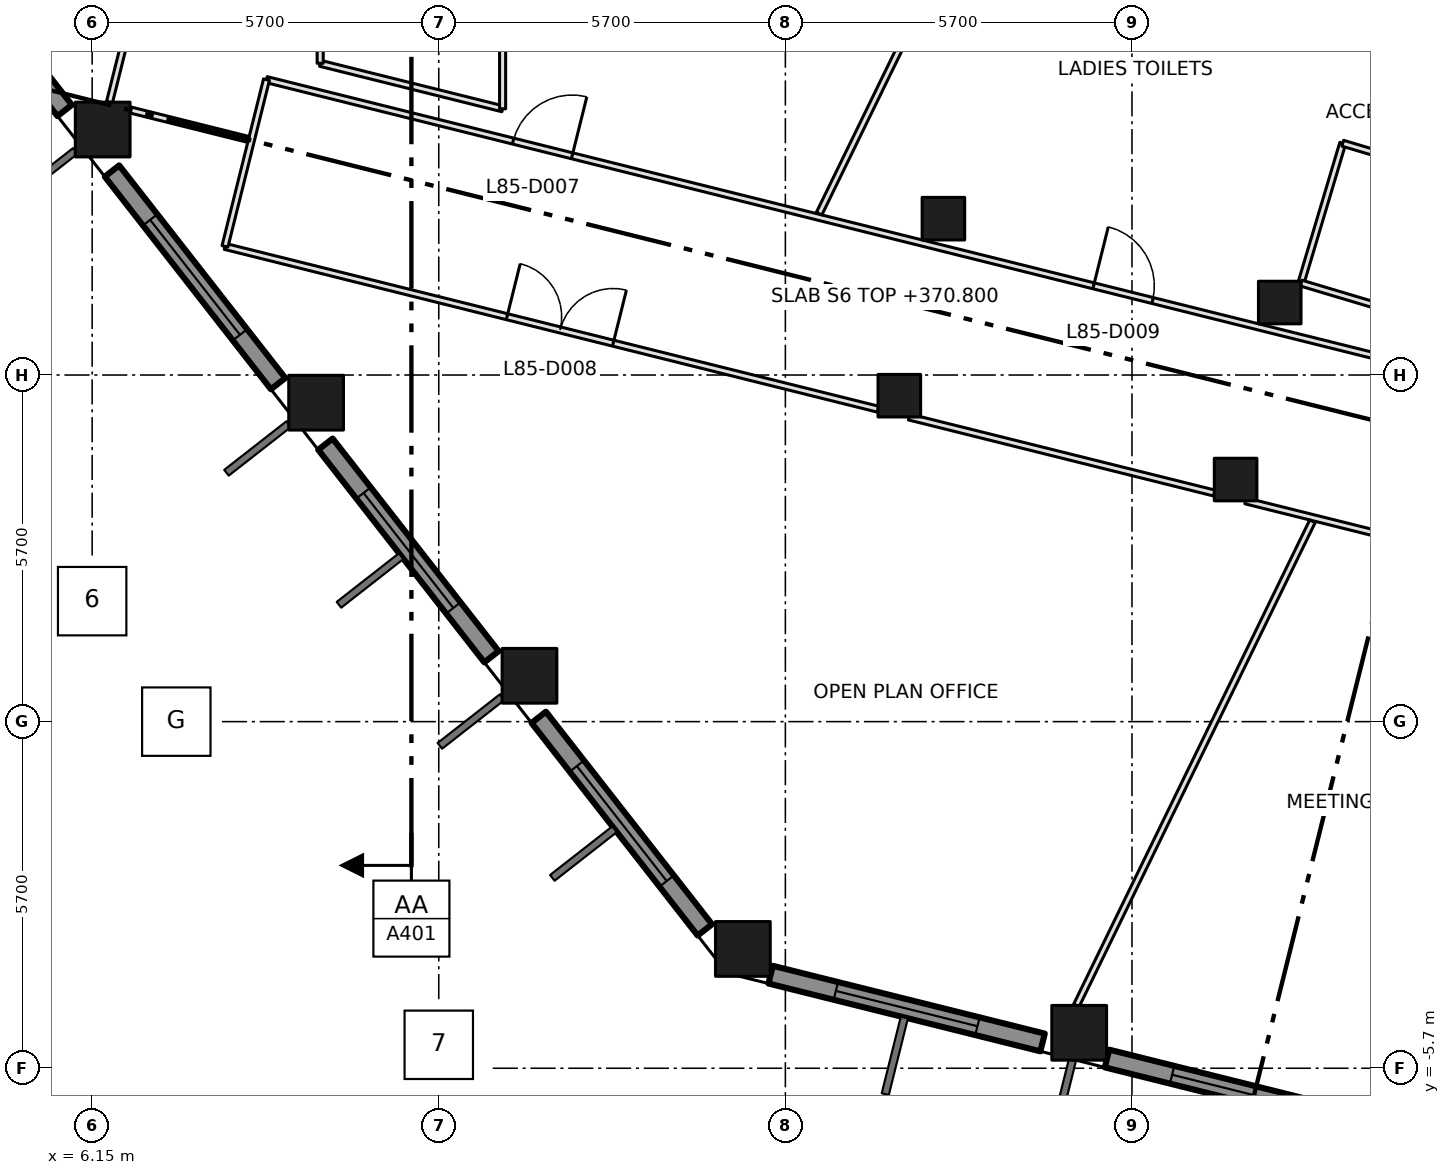
"""IFC4 building model, lengths in metres.
Left out: names, types, materials, properties, quantities, classifications, styles, units other than length and angle.
Written with IfcOpenShell. Run it as: python <this file> out.ifc"""

import sys

from ifc_helpers import new_model, si_unit, direction, frame, frame_2d, origin, origin_2d, place, context, subcontext, project, spatial, rectangle, extrude, element, fill, save


model = new_model("IFC4")
c1 = context("Model", 3, precision=1e-05, world=origin(), true_north=direction((0.0, 1.0)))
c2 = subcontext(c1, "Body", "Model", "MODEL_VIEW")
j1 = project(units=[si_unit("LENGTHUNIT", "METRE"), si_unit("PLANEANGLEUNIT", "RADIAN")], contexts=[c1])
p1 = place(None, origin())
s1 = spatial("IfcSite", under=j1, at=p1, CompositionType="ELEMENT")
p2 = place(p1, origin())
s2 = spatial("IfcBuilding", under=s1, at=p2, CompositionType="ELEMENT")
p3 = place(p2, frame((0.0, 0.0, 370.8)))
s3 = spatial("IfcBuildingStorey", under=s2, at=p3, CompositionType="ELEMENT", Elevation=370.8)
for number, where, z_axis, x_axis in (
    (1, (16.851, -3.738, 0.0), (0.0, 0.0, 1.0), (1.0, 0.0, 0.0)),
    (2, (13.342, 0.754, 0.0), (0.0, 0.0, 1.0), (1.0, 0.0, 0.0)),
    (3, (9.833, 5.245, 0.0), (0.0, 0.0, 1.0), (1.0, 0.0, 0.0)),
    (4, (6.323, 9.737, 0.0), (0.0, 0.0, 1.0), (1.0, 0.0, 0.0)),
    (5, (22.382, -5.117, 0.0), (0.0, 0.0, 1.0), (1.0, 0.0, 0.0)),
):
    element("IfcColumn", number, at=place(p3, frame(where, z_axis=z_axis, x_axis=x_axis)), inside=s3, PredefinedType="COLUMN", context=c2, shape_type="SweptSolid", body=[
        extrude(rectangle(XDim=0.9, YDim=0.9, at=origin_2d()), origin(), (0.0, 0.0, 1.0), 4.2),
    ])
for number, where, z_axis, x_axis in (
    (6, (19.424, 5.36, 0.0), (0.0, 0.0, 1.0), (1.0, 0.0, 0.0)),
    (7, (24.954, 3.981, 0.0), (0.0, 0.0, 1.0), (1.0, 0.0, 0.0)),
    (8, (20.149, 8.271, 0.0), (0.0, 0.0, 1.0), (1.0, 0.0, 0.0)),
    (9, (25.68, 6.892, 0.0), (0.0, 0.0, 1.0), (1.0, 0.0, 0.0)),
):
    element("IfcColumn", number, at=place(p3, frame(where, z_axis=z_axis, x_axis=x_axis)), inside=s3, PredefinedType="COLUMN", context=c2, shape_type="SweptSolid", body=[
        extrude(rectangle(XDim=0.7, YDim=0.7, at=origin_2d()), origin(), (0.0, 0.0, 1.0), 4.2),
    ])
p4 = place(p3, frame((2.967, 13.547, 0.0), z_axis=(0.0, 0.0, 1.0), x_axis=(0.615486001463, -0.788147817356, 0.0)))
e10 = element("IfcWall", 10, at=p4, inside=s3, PredefinedType="SOLIDWALL", context=c2, shape_type="SweptSolid", body=[
    extrude(rectangle(XDim=4.437, YDim=0.3, at=frame_2d((2.219, 0.0))), origin(), (0.0, 0.0, 1.0), 3.2),
])
p5 = place(p4, frame((1.018, 0.0, 0.8)))
e11 = element("IfcOpeningElement", 11, at=p5, cuts=e10, PredefinedType="OPENING", context=c2, shape_type="SweptSolid", body=[
    extrude(rectangle(XDim=2.4, YDim=2.1, at=frame_2d((1.2, 1.05))), frame((0.0, 0.16, 0.0), z_axis=(0.0, -1.0, 0.0), x_axis=(1.0, 0.0, 0.0)), (0.0, 0.0, 1.0), 0.32),
])
p6 = place(p3, frame((6.476, 9.055, 0.0), z_axis=(0.0, 0.0, 1.0), x_axis=(0.615649380255, -0.788020203162, 0.0)))
e12 = element("IfcWall", 12, at=p6, inside=s3, PredefinedType="SOLIDWALL", context=c2, shape_type="SweptSolid", body=[
    extrude(rectangle(XDim=4.438, YDim=0.3, at=frame_2d((2.219, 0.0))), origin(), (0.0, 0.0, 1.0), 3.2),
])
p7 = place(p6, frame((1.019, 0.0, 0.8)))
e13 = element("IfcOpeningElement", 13, at=p7, cuts=e12, PredefinedType="OPENING", context=c2, shape_type="SweptSolid", body=[
    extrude(rectangle(XDim=2.4, YDim=2.1, at=frame_2d((1.2, 1.05))), frame((0.0, 0.16, 0.0), z_axis=(0.0, -1.0, 0.0), x_axis=(1.0, 0.0, 0.0)), (0.0, 0.0, 1.0), 0.32),
])
p8 = place(p3, frame((9.986, 4.563, 0.0), z_axis=(0.0, 0.0, 1.0), x_axis=(0.615592779411, -0.788064419915, 0.0)))
e14 = element("IfcWall", 14, at=p8, inside=s3, PredefinedType="SOLIDWALL", context=c2, shape_type="SweptSolid", body=[
    extrude(rectangle(XDim=4.436, YDim=0.3, at=frame_2d((2.218, 0.0))), origin(), (0.0, 0.0, 1.0), 3.2),
])
p9 = place(p8, frame((1.018, 0.0, 0.8)))
e15 = element("IfcOpeningElement", 15, at=p9, cuts=e14, PredefinedType="OPENING", context=c2, shape_type="SweptSolid", body=[
    extrude(rectangle(XDim=2.4, YDim=2.1, at=frame_2d((1.2, 1.05))), frame((0.0, 0.16, 0.0), z_axis=(0.0, -1.0, 0.0), x_axis=(1.0, 0.0, 0.0)), (0.0, 0.0, 1.0), 0.32),
])
p10 = place(p3, frame((13.494, 0.071, 0.0), z_axis=(0.0, 0.0, 1.0), x_axis=(0.615763624226, -0.787930935476, 0.0)))
e16 = element("IfcWall", 16, at=p10, inside=s3, PredefinedType="SOLIDWALL", context=c2, shape_type="SweptSolid", body=[
    extrude(rectangle(XDim=4.437, YDim=0.3, at=frame_2d((2.219, 0.0))), origin(), (0.0, 0.0, 1.0), 3.2),
])
p11 = place(p10, frame((1.018, 0.0, 0.8)))
e17 = element("IfcOpeningElement", 17, at=p11, cuts=e16, PredefinedType="OPENING", context=c2, shape_type="SweptSolid", body=[
    extrude(rectangle(XDim=2.4, YDim=2.1, at=frame_2d((1.2, 1.05))), frame((0.0, 0.16, 0.0), z_axis=(0.0, -1.0, 0.0), x_axis=(1.0, 0.0, 0.0)), (0.0, 0.0, 1.0), 0.32),
])
p12 = place(p3, frame((17.308, -4.161, 0.0), z_axis=(0.0, 0.0, 1.0), x_axis=(0.970294992984, -0.241924836652, 0.0)))
e18 = element("IfcWall", 18, at=p12, inside=s3, PredefinedType="SOLIDWALL", context=c2, shape_type="SweptSolid", body=[
    extrude(rectangle(XDim=4.609, YDim=0.3, at=frame_2d((2.304, 0.0))), origin(), (0.0, 0.0, 1.0), 3.2),
])
p13 = place(p12, frame((1.105, 0.0, 0.8)))
e19 = element("IfcOpeningElement", 19, at=p13, cuts=e18, PredefinedType="OPENING", context=c2, shape_type="SweptSolid", body=[
    extrude(rectangle(XDim=2.4, YDim=2.1, at=frame_2d((1.2, 1.05))), frame((0.0, 0.16, 0.0), z_axis=(0.0, -1.0, 0.0), x_axis=(1.0, 0.0, 0.0)), (0.0, 0.0, 1.0), 0.32),
])
p14 = place(p3, frame((22.839, -5.54, 0.0), z_axis=(0.0, 0.0, 1.0), x_axis=(0.970282587769, -0.241974585177, 0.0)))
e20 = element("IfcWall", 20, at=p14, inside=s3, PredefinedType="SOLIDWALL", context=c2, shape_type="SweptSolid", body=[
    extrude(rectangle(XDim=4.608, YDim=0.3, at=frame_2d((2.304, 0.0))), origin(), (0.0, 0.0, 1.0), 3.2),
])
p15 = place(p14, frame((1.104, 0.0, 0.8)))
e21 = element("IfcOpeningElement", 21, at=p15, cuts=e20, PredefinedType="OPENING", context=c2, shape_type="SweptSolid", body=[
    extrude(rectangle(XDim=2.4, YDim=2.1, at=frame_2d((1.2, 1.05))), frame((0.0, 0.16, 0.0), z_axis=(0.0, -1.0, 0.0), x_axis=(1.0, 0.0, 0.0)), (0.0, 0.0, 1.0), 0.32),
])
p16 = place(p3, frame((8.334, 7.815, 0.0), z_axis=(0.0, 0.0, 1.0), x_axis=(0.970312231044, -0.241855688968, 0.0)))
e22 = element("IfcWall", 22, at=p16, inside=s3, PredefinedType="PARTITIONING", context=c2, shape_type="SweptSolid", body=[
    extrude(rectangle(XDim=11.069, YDim=0.1, at=frame_2d((5.534, 0.0))), origin(), (0.0, 0.0, 1.0), 3.9),
])
p17 = place(p16, frame((4.78, 0.0, 0.0)))
e23 = element("IfcOpeningElement", 23, at=p17, cuts=e22, PredefinedType="OPENING", context=c2, shape_type="SweptSolid", body=[
    extrude(rectangle(XDim=1.8, YDim=2.1, at=frame_2d((0.9, 1.05))), frame((0.0, 0.06, 0.0), z_axis=(0.0, -1.0, 0.0), x_axis=(1.0, 0.0, 0.0)), (0.0, 0.0, 1.0), 0.12),
])
p18 = place(p3, frame((9.017, 10.558, 0.0), z_axis=(0.0, 0.0, 1.0), x_axis=(0.970297621765, -0.241914293082, 0.0)))
e24 = element("IfcWall", 24, at=p18, inside=s3, PredefinedType="PARTITIONING", context=c2, shape_type="SweptSolid", body=[
    extrude(rectangle(XDim=19.879, YDim=0.1, at=frame_2d((9.94, 0.0))), origin(), (0.0, 0.0, 1.0), 3.9),
])
p19 = place(p18, frame((4.18, 0.0, 0.0)))
e25 = element("IfcOpeningElement", 25, at=p19, cuts=e24, PredefinedType="OPENING", context=c2, shape_type="SweptSolid", body=[
    extrude(rectangle(XDim=1.0, YDim=2.1, at=frame_2d((0.5, 1.05))), frame((0.0, 0.06, 0.0), z_axis=(0.0, -1.0, 0.0), x_axis=(1.0, 0.0, 0.0)), (0.0, 0.0, 1.0), 0.12),
])
p20 = place(p18, frame((14.018, 0.0, 0.0)))
e26 = element("IfcOpeningElement", 26, at=p20, cuts=e24, PredefinedType="OPENING", context=c2, shape_type="SweptSolid", body=[
    extrude(rectangle(XDim=1.0, YDim=2.1, at=frame_2d((0.5, 1.05))), frame((0.0, 0.06, 0.0), z_axis=(0.0, -1.0, 0.0), x_axis=(1.0, 0.0, 0.0)), (0.0, 0.0, 1.0), 0.12),
])
p21 = place(p3, frame((9.017, 10.558, 0.0), z_axis=(0.0, 0.0, 1.0), x_axis=(-0.241641419317, -0.970365613813, 0.0)))
e27 = element("IfcWall", 27, at=p21, inside=s3, PredefinedType="PARTITIONING", context=c2, shape_type="SweptSolid", body=[
    extrude(rectangle(XDim=2.827, YDim=0.1, at=frame_2d((1.414, 0.0))), origin(), (0.0, 0.0, 1.0), 3.9),
])
p22 = place(p3, frame((9.9, 10.826, 0.0), z_axis=(0.0, 0.0, 1.0), x_axis=(0.970290953223, -0.241941038466, 0.0)))
e28 = element("IfcWall", 28, at=p22, inside=s3, PredefinedType="PARTITIONING", context=c2, shape_type="SweptSolid", body=[
    extrude(rectangle(XDim=3.092, YDim=0.1, at=frame_2d((1.546, 0.0))), origin(), (0.0, 0.0, 1.0), 3.9),
])
p23 = place(p3, frame((9.9, 12.2, 0.0), z_axis=(0.0, 0.0, 1.0), x_axis=(0.0, -1.0, 0.0)))
e29 = element("IfcWall", 29, at=p23, inside=s3, PredefinedType="PARTITIONING", context=c2, shape_type="SweptSolid", body=[
    extrude(rectangle(XDim=1.374, YDim=0.1, at=frame_2d((0.687, 0.0))), origin(), (0.0, 0.0, 1.0), 3.9),
])
p24 = place(p3, frame((12.9, 10.078, 0.0), z_axis=(0.0, 0.0, 1.0), x_axis=(0.0, 1.0, 0.0)))
e30 = element("IfcWall", 30, at=p24, inside=s3, PredefinedType="PARTITIONING", context=c2, shape_type="SweptSolid", body=[
    extrude(rectangle(XDim=4.022, YDim=0.1, at=frame_2d((2.011, 0.0))), origin(), (0.0, 0.0, 1.0), 3.9),
])
p25 = place(p3, frame((19.586, 5.01, 0.0), z_axis=(0.0, 0.0, 1.0), x_axis=(0.970303347181, -0.241891327769, 0.0)))
e31 = element("IfcWall", 31, at=p25, inside=s3, PredefinedType="PARTITIONING", context=c2, shape_type="SweptSolid", body=[
    extrude(rectangle(XDim=5.172, YDim=0.1, at=frame_2d((2.586, 0.0))), origin(), (0.0, 0.0, 1.0), 3.9),
])
p26 = place(p3, frame((25.118, 3.631, 0.0), z_axis=(0.0, 0.0, 1.0), x_axis=(0.970281210621, -0.241980107272, 0.0)))
e32 = element("IfcWall", 32, at=p26, inside=s3, PredefinedType="PARTITIONING", context=c2, shape_type="SweptSolid", body=[
    extrude(rectangle(XDim=5.171, YDim=0.1, at=frame_2d((2.585, 0.0))), origin(), (0.0, 0.0, 1.0), 3.9),
])
p27 = place(p26, frame((2.629, 0.0, 0.0)))
e33 = element("IfcOpeningElement", 33, at=p27, cuts=e32, PredefinedType="OPENING", context=c2, shape_type="SweptSolid", body=[
    extrude(rectangle(XDim=1.0, YDim=2.1, at=frame_2d((0.5, 1.05))), frame((0.0, 0.06, 0.0), z_axis=(0.0, -1.0, 0.0), x_axis=(1.0, 0.0, 0.0)), (0.0, 0.0, 1.0), 0.12),
])
p28 = place(p3, frame((6.922, 12.138, 0.0), z_axis=(0.0, 0.0, 1.0), x_axis=(-0.24222136375, -0.97022101139, 0.0)))
e34 = element("IfcWall", 34, at=p28, inside=s3, PredefinedType="PARTITIONING", context=c2, shape_type="SweptSolid", body=[
    extrude(rectangle(XDim=2.011, YDim=0.1, at=frame_2d((1.005, 0.0))), origin(), (0.0, 0.0, 1.0), 3.9),
])
p29 = place(p3, frame((8.72, 9.574, 0.0), z_axis=(0.0, 0.0, 1.0), x_axis=(-0.970221168815, 0.24222073318, 0.0)))
e35 = element("IfcWall", 35, at=p29, inside=s3, PredefinedType="PARTITIONING", context=c2, shape_type="SweptSolid", body=[
    extrude(rectangle(XDim=2.007, YDim=0.1, at=frame_2d((1.003, 0.0))), origin(), (0.0, 0.0, 1.0), 3.9),
])
p30 = place(p3, frame((18.105, 8.354, 0.0), z_axis=(0.0, 0.0, 1.0), x_axis=(0.438424384383, 0.898768078638, 0.0)))
e36 = element("IfcWall", 36, at=p30, inside=s3, PredefinedType="PARTITIONING", context=c2, shape_type="SweptSolid", body=[
    extrude(rectangle(XDim=6.393, YDim=0.1, at=frame_2d((3.197, 0.0))), origin(), (0.0, 0.0, 1.0), 3.9),
])
p31 = place(p3, frame((22.336, -4.667, 0.0), z_axis=(0.0, 0.0, 1.0), x_axis=(0.438261260169, 0.89884763327, 0.0)))
e37 = element("IfcWall", 37, at=p31, inside=s3, PredefinedType="PARTITIONING", context=c2, shape_type="SweptSolid", body=[
    extrude(rectangle(XDim=8.858, YDim=0.1, at=frame_2d((4.429, 0.0))), origin(), (0.0, 0.0, 1.0), 3.9),
])
p32 = place(p3, frame((26.03, 7.214, 0.0), z_axis=(0.0, 0.0, 1.0), x_axis=(0.286077381682, 0.958206518288, 0.0)))
e38 = element("IfcWall", 38, at=p32, inside=s3, PredefinedType="PARTITIONING", context=c2, shape_type="SweptSolid", body=[
    extrude(rectangle(XDim=2.398, YDim=0.1, at=frame_2d((1.199, 0.0))), origin(), (0.0, 0.0, 1.0), 3.9),
])
p33 = place(p3, frame((26.716, 9.512, 0.0), z_axis=(0.0, 0.0, 1.0), x_axis=(0.958168093169, -0.286206053804, 0.0)))
e39 = element("IfcWall", 39, at=p33, inside=s3, PredefinedType="PARTITIONING", context=c2, shape_type="SweptSolid", body=[
    extrude(rectangle(XDim=2.551, YDim=0.1, at=frame_2d((1.275, 0.0))), origin(), (0.0, 0.0, 1.0), 3.9),
])
p34 = place(p3, frame((28.473, 6.482, 0.0), z_axis=(0.0, 0.0, 1.0), x_axis=(-0.958136712348, 0.286311090338, 0.0)))
e40 = element("IfcWall", 40, at=p34, inside=s3, PredefinedType="PARTITIONING", context=c2, shape_type="SweptSolid", body=[
    extrude(rectangle(XDim=2.55, YDim=0.1, at=frame_2d((1.275, 0.0))), origin(), (0.0, 0.0, 1.0), 3.9),
])
p35 = place(p7, origin())
e41 = element("IfcWindow", 41, at=p35, inside=s3, PartitioningType="DOUBLE_PANEL_VERTICAL", PredefinedType="WINDOW", context=c2, shape_type="SweptSolid", body=[
    extrude(rectangle(XDim=2.4, YDim=2.1, at=frame_2d((1.2, 1.05))), frame((0.0, 0.03, 0.0), z_axis=(0.0, -1.0, 0.0), x_axis=(1.0, 0.0, 0.0)), (0.0, 0.0, 1.0), 0.06),
])
fill(e13, e41)
p36 = place(p9, origin())
e42 = element("IfcWindow", 42, at=p36, inside=s3, PartitioningType="DOUBLE_PANEL_VERTICAL", PredefinedType="WINDOW", context=c2, shape_type="SweptSolid", body=[
    extrude(rectangle(XDim=2.4, YDim=2.1, at=frame_2d((1.2, 1.05))), frame((0.0, 0.03, 0.0), z_axis=(0.0, -1.0, 0.0), x_axis=(1.0, 0.0, 0.0)), (0.0, 0.0, 1.0), 0.06),
])
fill(e15, e42)
p37 = place(p11, origin())
e43 = element("IfcWindow", 43, at=p37, inside=s3, PartitioningType="DOUBLE_PANEL_VERTICAL", PredefinedType="WINDOW", context=c2, shape_type="SweptSolid", body=[
    extrude(rectangle(XDim=2.4, YDim=2.1, at=frame_2d((1.2, 1.05))), frame((0.0, 0.03, 0.0), z_axis=(0.0, -1.0, 0.0), x_axis=(1.0, 0.0, 0.0)), (0.0, 0.0, 1.0), 0.06),
])
fill(e17, e43)
p38 = place(p13, origin())
e44 = element("IfcWindow", 44, at=p38, inside=s3, PartitioningType="DOUBLE_PANEL_VERTICAL", PredefinedType="WINDOW", context=c2, shape_type="SweptSolid", body=[
    extrude(rectangle(XDim=2.4, YDim=2.1, at=frame_2d((1.2, 1.05))), frame((0.0, 0.03, 0.0), z_axis=(0.0, -1.0, 0.0), x_axis=(1.0, 0.0, 0.0)), (0.0, 0.0, 1.0), 0.06),
])
fill(e19, e44)
p39 = place(p15, origin())
e45 = element("IfcWindow", 45, at=p39, inside=s3, PartitioningType="DOUBLE_PANEL_VERTICAL", PredefinedType="WINDOW", context=c2, shape_type="SweptSolid", body=[
    extrude(rectangle(XDim=2.4, YDim=2.1, at=frame_2d((1.2, 1.05))), frame((0.0, 0.03, 0.0), z_axis=(0.0, -1.0, 0.0), x_axis=(1.0, 0.0, 0.0)), (0.0, 0.0, 1.0), 0.06),
])
fill(e21, e45)
p40 = place(p19, origin())
e46 = element("IfcDoor", 46, at=p40, inside=s3, OperationType="SINGLE_SWING_RIGHT", PredefinedType="DOOR", context=c2, shape_type="SweptSolid", body=[
    extrude(rectangle(XDim=1.0, YDim=2.1, at=frame_2d((0.5, 1.05))), frame((0.0, 0.025, 0.0), z_axis=(0.0, -1.0, 0.0), x_axis=(1.0, 0.0, 0.0)), (0.0, 0.0, 1.0), 0.05),
])
fill(e25, e46)
p41 = place(p17, origin())
e47 = element("IfcDoor", 47, at=p41, inside=s3, OperationType="DOUBLE_DOOR_SINGLE_SWING", PredefinedType="DOOR", context=c2, shape_type="SweptSolid", body=[
    extrude(rectangle(XDim=1.8, YDim=2.1, at=frame_2d((0.9, 1.05))), frame((0.0, 0.025, 0.0), z_axis=(0.0, -1.0, 0.0), x_axis=(1.0, 0.0, 0.0)), (0.0, 0.0, 1.0), 0.05),
])
fill(e23, e47)
p42 = place(p20, origin())
e48 = element("IfcDoor", 48, at=p42, inside=s3, OperationType="SINGLE_SWING_LEFT", PredefinedType="DOOR", context=c2, shape_type="SweptSolid", body=[
    extrude(rectangle(XDim=1.0, YDim=2.1, at=frame_2d((0.5, 1.05))), frame((0.0, 0.025, 0.0), z_axis=(0.0, -1.0, 0.0), x_axis=(1.0, 0.0, 0.0)), (0.0, 0.0, 1.0), 0.05),
])
fill(e26, e48)
save(model, sys.argv[1])
